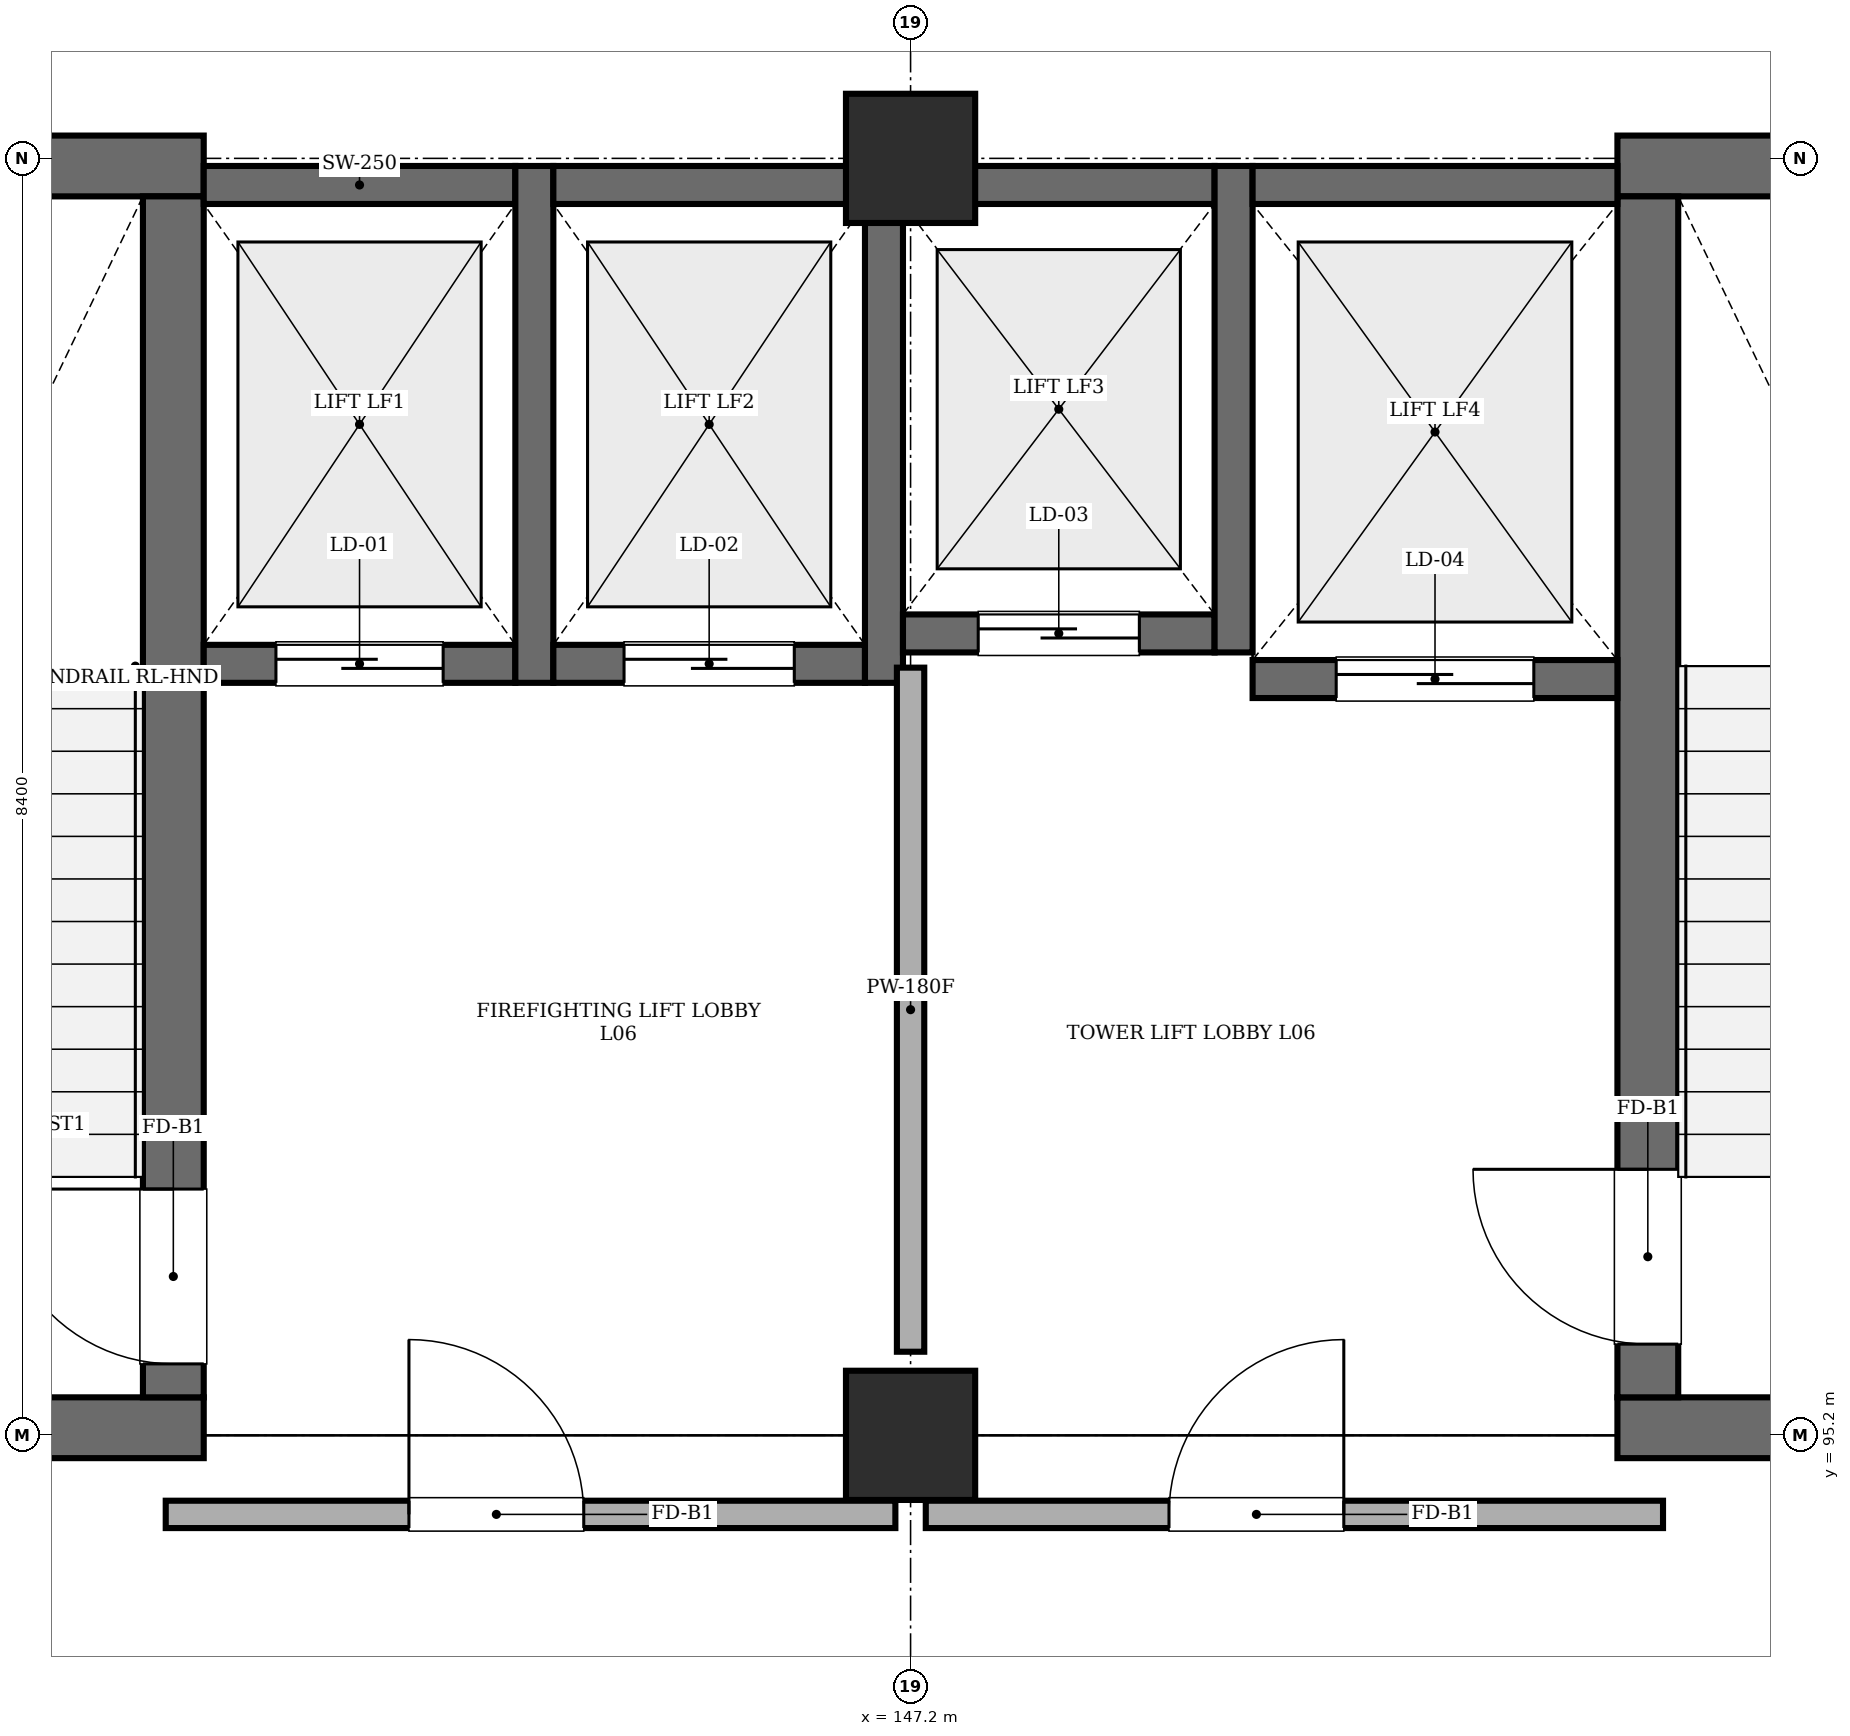
"""IFC4 building model, lengths in metres.
Left out: names, types, materials, properties, quantities, classifications, styles, units other than length and angle.
Written with IfcOpenShell. Run it as: python <this file> out.ifc"""

import sys

from ifc_helpers import new_model, si_unit, direction, frame, frame_2d, origin, origin_2d, place, context, subcontext, project, spatial, rectangle, extrude, element, fill, save


model = new_model("IFC4")
c1 = context("Model", 3, precision=1e-05, world=origin(), true_north=direction((0.0, 1.0)))
c2 = subcontext(c1, "Body", "Model", "MODEL_VIEW")
j1 = project(units=[si_unit("LENGTHUNIT", "METRE"), si_unit("PLANEANGLEUNIT", "RADIAN")], contexts=[c1])
p1 = place(None, origin())
s1 = spatial("IfcSite", under=j1, at=p1, CompositionType="ELEMENT")
p2 = place(p1, origin())
s2 = spatial("IfcBuilding", under=s1, at=p2, CompositionType="ELEMENT")
p3 = place(p2, frame((0.0, 0.0, 23.4)))
s3 = spatial("IfcBuildingStorey", under=s2, at=p3, CompositionType="ELEMENT", Elevation=23.4)
for number, where, z_axis, x_axis in (
    (1, (147.2, 95.2, 0.0), (0.0, 0.0, 1.0), (1.0, 0.0, 0.0)),
    (2, (147.2, 103.6, 0.0), (0.0, 0.0, 1.0), (1.0, 0.0, 0.0)),
):
    element("IfcColumn", number, at=place(p3, frame(where, z_axis=z_axis, x_axis=x_axis)), inside=s3, PredefinedType="COLUMN", context=c2, shape_type="SweptSolid", body=[
        extrude(rectangle(XDim=0.85, YDim=0.85, at=origin_2d()), origin(), (0.0, 0.0, 1.0), 4.0),
    ])
for number, where, z_axis, x_axis in (
    (3, (138.65, 95.25, 0.0), (0.0, 0.0, 1.0), (1.0, 0.0, 0.0)),
    (4, (138.65, 103.55, 0.0), (0.0, 0.0, 1.0), (1.0, 0.0, 0.0)),
):
    element("IfcWall", number, at=place(p3, frame(where, z_axis=z_axis, x_axis=x_axis)), inside=s3, PredefinedType="SHEAR", context=c2, shape_type="SweptSolid", body=[
        extrude(rectangle(XDim=3.9, YDim=0.4, at=frame_2d((1.95, 0.0))), origin(), (0.0, 0.0, 1.0), 4.0),
    ])
p4 = place(p3, frame((142.35, 95.45, 0.0), z_axis=(0.0, 0.0, 1.0), x_axis=(0.0, 1.0, 0.0)))
e5 = element("IfcWall", 5, at=p4, inside=s3, PredefinedType="SHEAR", context=c2, shape_type="SweptSolid", body=[
    extrude(rectangle(XDim=7.9, YDim=0.4, at=frame_2d((3.95, 0.0))), origin(), (0.0, 0.0, 1.0), 4.0),
])
p5 = place(p4, frame((0.22, 0.0, 0.0)))
e6 = element("IfcOpeningElement", 6, at=p5, cuts=e5, PredefinedType="OPENING", context=c2, shape_type="SweptSolid", body=[
    extrude(rectangle(XDim=1.15, YDim=2.15, at=frame_2d((0.575, 1.075))), frame((0.0, 0.21, 0.0), z_axis=(0.0, -1.0, 0.0), x_axis=(1.0, 0.0, 0.0)), (0.0, 0.0, 1.0), 0.42),
])
for number, where, z_axis, x_axis in (
    (7, (151.85, 95.25, 0.0), (0.0, 0.0, 1.0), (1.0, 0.0, 0.0)),
    (8, (151.85, 103.55, 0.0), (0.0, 0.0, 1.0), (1.0, 0.0, 0.0)),
):
    element("IfcWall", number, at=place(p3, frame(where, z_axis=z_axis, x_axis=x_axis)), inside=s3, PredefinedType="SHEAR", context=c2, shape_type="SweptSolid", body=[
        extrude(rectangle(XDim=3.9, YDim=0.4, at=frame_2d((1.95, 0.0))), origin(), (0.0, 0.0, 1.0), 4.0),
    ])
p6 = place(p3, frame((152.05, 95.45, 0.0), z_axis=(0.0, 0.0, 1.0), x_axis=(0.0, 1.0, 0.0)))
e9 = element("IfcWall", 9, at=p6, inside=s3, PredefinedType="SHEAR", context=c2, shape_type="SweptSolid", body=[
    extrude(rectangle(XDim=7.9, YDim=0.4, at=frame_2d((3.95, 0.0))), origin(), (0.0, 0.0, 1.0), 4.0),
])
p7 = place(p6, frame((0.35, 0.0, 0.0)))
e10 = element("IfcOpeningElement", 10, at=p7, cuts=e9, PredefinedType="OPENING", context=c2, shape_type="SweptSolid", body=[
    extrude(rectangle(XDim=1.15, YDim=2.15, at=frame_2d((0.575, 1.075))), frame((0.0, 0.21, 0.0), z_axis=(0.0, -1.0, 0.0), x_axis=(1.0, 0.0, 0.0)), (0.0, 0.0, 1.0), 0.42),
])
p8 = place(p3, frame((142.55, 100.275, 0.0), z_axis=(0.0, 0.0, 1.0), x_axis=(1.0, 0.0, 0.0)))
e11 = element("IfcWall", 11, at=p8, inside=s3, PredefinedType="SHEAR", context=c2, shape_type="SweptSolid", body=[
    extrude(rectangle(XDim=2.05, YDim=0.25, at=frame_2d((1.025, 0.0))), origin(), (0.0, 0.0, 1.0), 4.0),
])
p9 = place(p8, frame((0.475, 0.0, 0.0)))
e12 = element("IfcOpeningElement", 12, at=p9, cuts=e11, PredefinedType="OPENING", context=c2, shape_type="SweptSolid", body=[
    extrude(rectangle(XDim=1.1, YDim=2.15, at=frame_2d((0.55, 1.075))), frame((0.0, 0.135, 0.0), z_axis=(0.0, -1.0, 0.0), x_axis=(1.0, 0.0, 0.0)), (0.0, 0.0, 1.0), 0.27),
])
p10 = place(p3, frame((142.55, 103.425, 0.0), z_axis=(0.0, 0.0, 1.0), x_axis=(1.0, 0.0, 0.0)))
e13 = element("IfcWall", 13, at=p10, inside=s3, PredefinedType="SHEAR", context=c2, shape_type="SweptSolid", body=[
    extrude(rectangle(XDim=2.05, YDim=0.25, at=frame_2d((1.025, 0.0))), origin(), (0.0, 0.0, 1.0), 4.0),
])
p11 = place(p3, frame((144.725, 100.15, 0.0), z_axis=(0.0, 0.0, 1.0), x_axis=(0.0, 1.0, 0.0)))
e14 = element("IfcWall", 14, at=p11, inside=s3, PredefinedType="SHEAR", context=c2, shape_type="SweptSolid", body=[
    extrude(rectangle(XDim=3.4, YDim=0.25, at=frame_2d((1.7, 0.0))), origin(), (0.0, 0.0, 1.0), 4.0),
])
p12 = place(p3, frame((144.85, 100.275, 0.0), z_axis=(0.0, 0.0, 1.0), x_axis=(1.0, 0.0, 0.0)))
e15 = element("IfcWall", 15, at=p12, inside=s3, PredefinedType="SHEAR", context=c2, shape_type="SweptSolid", body=[
    extrude(rectangle(XDim=2.05, YDim=0.25, at=frame_2d((1.025, 0.0))), origin(), (0.0, 0.0, 1.0), 4.0),
])
p13 = place(p12, frame((0.465, 0.0, 0.0)))
e16 = element("IfcOpeningElement", 16, at=p13, cuts=e15, PredefinedType="OPENING", context=c2, shape_type="SweptSolid", body=[
    extrude(rectangle(XDim=1.12, YDim=2.15, at=frame_2d((0.56, 1.075))), frame((0.0, 0.135, 0.0), z_axis=(0.0, -1.0, 0.0), x_axis=(1.0, 0.0, 0.0)), (0.0, 0.0, 1.0), 0.27),
])
p14 = place(p3, frame((144.85, 103.425, 0.0), z_axis=(0.0, 0.0, 1.0), x_axis=(1.0, 0.0, 0.0)))
e17 = element("IfcWall", 17, at=p14, inside=s3, PredefinedType="SHEAR", context=c2, shape_type="SweptSolid", body=[
    extrude(rectangle(XDim=2.05, YDim=0.25, at=frame_2d((1.025, 0.0))), origin(), (0.0, 0.0, 1.0), 4.0),
])
p15 = place(p3, frame((147.025, 100.15, 0.0), z_axis=(0.0, 0.0, 1.0), x_axis=(0.0, 1.0, 0.0)))
e18 = element("IfcWall", 18, at=p15, inside=s3, PredefinedType="SHEAR", context=c2, shape_type="SweptSolid", body=[
    extrude(rectangle(XDim=3.4, YDim=0.25, at=frame_2d((1.7, 0.0))), origin(), (0.0, 0.0, 1.0), 4.0),
])
p16 = place(p3, frame((147.15, 100.475, 0.0), z_axis=(0.0, 0.0, 1.0), x_axis=(1.0, 0.0, 0.0)))
e19 = element("IfcWall", 19, at=p16, inside=s3, PredefinedType="SHEAR", context=c2, shape_type="SweptSolid", body=[
    extrude(rectangle(XDim=2.05, YDim=0.25, at=frame_2d((1.025, 0.0))), origin(), (0.0, 0.0, 1.0), 4.0),
])
p17 = place(p16, frame((0.495, 0.0, 0.0)))
e20 = element("IfcOpeningElement", 20, at=p17, cuts=e19, PredefinedType="OPENING", context=c2, shape_type="SweptSolid", body=[
    extrude(rectangle(XDim=1.06, YDim=2.15, at=frame_2d((0.53, 1.075))), frame((0.0, 0.135, 0.0), z_axis=(0.0, -1.0, 0.0), x_axis=(1.0, 0.0, 0.0)), (0.0, 0.0, 1.0), 0.27),
])
p18 = place(p3, frame((147.15, 103.425, 0.0), z_axis=(0.0, 0.0, 1.0), x_axis=(1.0, 0.0, 0.0)))
e21 = element("IfcWall", 21, at=p18, inside=s3, PredefinedType="SHEAR", context=c2, shape_type="SweptSolid", body=[
    extrude(rectangle(XDim=2.05, YDim=0.25, at=frame_2d((1.025, 0.0))), origin(), (0.0, 0.0, 1.0), 4.0),
])
p19 = place(p3, frame((149.325, 100.35, 0.0), z_axis=(0.0, 0.0, 1.0), x_axis=(0.0, 1.0, 0.0)))
e22 = element("IfcWall", 22, at=p19, inside=s3, PredefinedType="SHEAR", context=c2, shape_type="SweptSolid", body=[
    extrude(rectangle(XDim=3.2, YDim=0.25, at=frame_2d((1.6, 0.0))), origin(), (0.0, 0.0, 1.0), 4.0),
])
p20 = place(p3, frame((149.45, 100.175, 0.0), z_axis=(0.0, 0.0, 1.0), x_axis=(1.0, 0.0, 0.0)))
e23 = element("IfcWall", 23, at=p20, inside=s3, PredefinedType="SHEAR", context=c2, shape_type="SweptSolid", body=[
    extrude(rectangle(XDim=2.4, YDim=0.25, at=frame_2d((1.2, 0.0))), origin(), (0.0, 0.0, 1.0), 4.0),
])
p21 = place(p20, frame((0.55, 0.0, 0.0)))
e24 = element("IfcOpeningElement", 24, at=p21, cuts=e23, PredefinedType="OPENING", context=c2, shape_type="SweptSolid", body=[
    extrude(rectangle(XDim=1.3, YDim=2.25, at=frame_2d((0.65, 1.125))), frame((0.0, 0.135, 0.0), z_axis=(0.0, -1.0, 0.0), x_axis=(1.0, 0.0, 0.0)), (0.0, 0.0, 1.0), 0.27),
])
p22 = place(p3, frame((149.45, 103.425, 0.0), z_axis=(0.0, 0.0, 1.0), x_axis=(1.0, 0.0, 0.0)))
e25 = element("IfcWall", 25, at=p22, inside=s3, PredefinedType="SHEAR", context=c2, shape_type="SweptSolid", body=[
    extrude(rectangle(XDim=2.4, YDim=0.25, at=frame_2d((1.2, 0.0))), origin(), (0.0, 0.0, 1.0), 4.0),
])
p23 = place(p3, frame((142.3, 94.68, 0.0), z_axis=(0.0, 0.0, 1.0), x_axis=(1.0, 0.0, 0.0)))
e26 = element("IfcWall", 26, at=p23, inside=s3, PredefinedType="STANDARD", context=c2, shape_type="SweptSolid", body=[
    extrude(rectangle(XDim=4.8, YDim=0.18, at=frame_2d((2.4, 0.0))), origin(), (0.0, 0.0, 1.0), 4.0),
])
p24 = place(p23, frame((1.6, 0.0, 0.0)))
e27 = element("IfcOpeningElement", 27, at=p24, cuts=e26, PredefinedType="OPENING", context=c2, shape_type="SweptSolid", body=[
    extrude(rectangle(XDim=1.15, YDim=2.15, at=frame_2d((0.575, 1.075))), frame((0.0, 0.1, 0.0), z_axis=(0.0, -1.0, 0.0), x_axis=(1.0, 0.0, 0.0)), (0.0, 0.0, 1.0), 0.2),
])
p25 = place(p3, frame((147.3, 94.68, 0.0), z_axis=(0.0, 0.0, 1.0), x_axis=(1.0, 0.0, 0.0)))
e28 = element("IfcWall", 28, at=p25, inside=s3, PredefinedType="STANDARD", context=c2, shape_type="SweptSolid", body=[
    extrude(rectangle(XDim=4.85, YDim=0.18, at=frame_2d((2.425, 0.0))), origin(), (0.0, 0.0, 1.0), 4.0),
])
p26 = place(p25, frame((1.6, 0.0, 0.0)))
e29 = element("IfcOpeningElement", 29, at=p26, cuts=e28, PredefinedType="OPENING", context=c2, shape_type="SweptSolid", body=[
    extrude(rectangle(XDim=1.15, YDim=2.15, at=frame_2d((0.575, 1.075))), frame((0.0, 0.1, 0.0), z_axis=(0.0, -1.0, 0.0), x_axis=(1.0, 0.0, 0.0)), (0.0, 0.0, 1.0), 0.2),
])
p27 = place(p3, frame((147.2, 95.75, 0.0), z_axis=(0.0, 0.0, 1.0), x_axis=(0.0, 1.0, 0.0)))
e30 = element("IfcWall", 30, at=p27, inside=s3, PredefinedType="STANDARD", context=c2, shape_type="SweptSolid", body=[
    extrude(rectangle(XDim=4.5, YDim=0.18, at=frame_2d((2.25, 0.0))), origin(), (0.0, 0.0, 1.0), 3.3),
])
p28 = place(p24, origin())
e31 = element("IfcDoor", 31, at=p28, inside=s3, OperationType="SINGLE_SWING_LEFT", PredefinedType="DOOR", context=c2, shape_type="SweptSolid", body=[
    extrude(rectangle(XDim=1.15, YDim=2.15, at=frame_2d((0.575, 1.075))), frame((0.0, 0.025, 0.0), z_axis=(0.0, -1.0, 0.0), x_axis=(1.0, 0.0, 0.0)), (0.0, 0.0, 1.0), 0.05),
])
fill(e27, e31)
p29 = place(p26, origin())
e32 = element("IfcDoor", 32, at=p29, inside=s3, OperationType="SINGLE_SWING_RIGHT", PredefinedType="DOOR", context=c2, shape_type="SweptSolid", body=[
    extrude(rectangle(XDim=1.15, YDim=2.15, at=frame_2d((0.575, 1.075))), frame((0.0, 0.025, 0.0), z_axis=(0.0, -1.0, 0.0), x_axis=(1.0, 0.0, 0.0)), (0.0, 0.0, 1.0), 0.05),
])
fill(e29, e32)
p30 = place(p5, origin())
e33 = element("IfcDoor", 33, at=p30, inside=s3, OperationType="SINGLE_SWING_RIGHT", PredefinedType="DOOR", context=c2, shape_type="SweptSolid", body=[
    extrude(rectangle(XDim=1.15, YDim=2.15, at=frame_2d((0.575, 1.075))), frame((0.0, 0.025, 0.0), z_axis=(0.0, -1.0, 0.0), x_axis=(1.0, 0.0, 0.0)), (0.0, 0.0, 1.0), 0.05),
])
fill(e6, e33)
p31 = place(p7, origin())
e34 = element("IfcDoor", 34, at=p31, inside=s3, OperationType="SINGLE_SWING_RIGHT", PredefinedType="DOOR", context=c2, shape_type="SweptSolid", body=[
    extrude(rectangle(XDim=1.15, YDim=2.15, at=frame_2d((0.575, 1.075))), frame((0.0, 0.025, 0.0), z_axis=(0.0, -1.0, 0.0), x_axis=(1.0, 0.0, 0.0)), (0.0, 0.0, 1.0), 0.05),
])
fill(e10, e34)
p32 = place(p9, origin())
e35 = element("IfcDoor", 35, at=p32, inside=s3, OperationType="SLIDING_TO_LEFT", PredefinedType="DOOR", context=c2, shape_type="SweptSolid", body=[
    extrude(rectangle(XDim=1.1, YDim=2.15, at=frame_2d((0.55, 1.075))), frame((0.0, 0.025, 0.0), z_axis=(0.0, -1.0, 0.0), x_axis=(1.0, 0.0, 0.0)), (0.0, 0.0, 1.0), 0.05),
])
fill(e12, e35)
p33 = place(p13, origin())
e36 = element("IfcDoor", 36, at=p33, inside=s3, OperationType="SLIDING_TO_LEFT", PredefinedType="DOOR", context=c2, shape_type="SweptSolid", body=[
    extrude(rectangle(XDim=1.12, YDim=2.15, at=frame_2d((0.56, 1.075))), frame((0.0, 0.025, 0.0), z_axis=(0.0, -1.0, 0.0), x_axis=(1.0, 0.0, 0.0)), (0.0, 0.0, 1.0), 0.05),
])
fill(e16, e36)
p34 = place(p17, origin())
e37 = element("IfcDoor", 37, at=p34, inside=s3, OperationType="SLIDING_TO_LEFT", PredefinedType="DOOR", context=c2, shape_type="SweptSolid", body=[
    extrude(rectangle(XDim=1.06, YDim=2.15, at=frame_2d((0.53, 1.075))), frame((0.0, 0.025, 0.0), z_axis=(0.0, -1.0, 0.0), x_axis=(1.0, 0.0, 0.0)), (0.0, 0.0, 1.0), 0.05),
])
fill(e20, e37)
p35 = place(p21, origin())
e38 = element("IfcDoor", 38, at=p35, inside=s3, OperationType="SLIDING_TO_LEFT", PredefinedType="DOOR", context=c2, shape_type="SweptSolid", body=[
    extrude(rectangle(XDim=1.3, YDim=2.25, at=frame_2d((0.65, 1.125))), frame((0.0, 0.025, 0.0), z_axis=(0.0, -1.0, 0.0), x_axis=(1.0, 0.0, 0.0)), (0.0, 0.0, 1.0), 0.05),
])
fill(e24, e38)
save(model, sys.argv[1])
